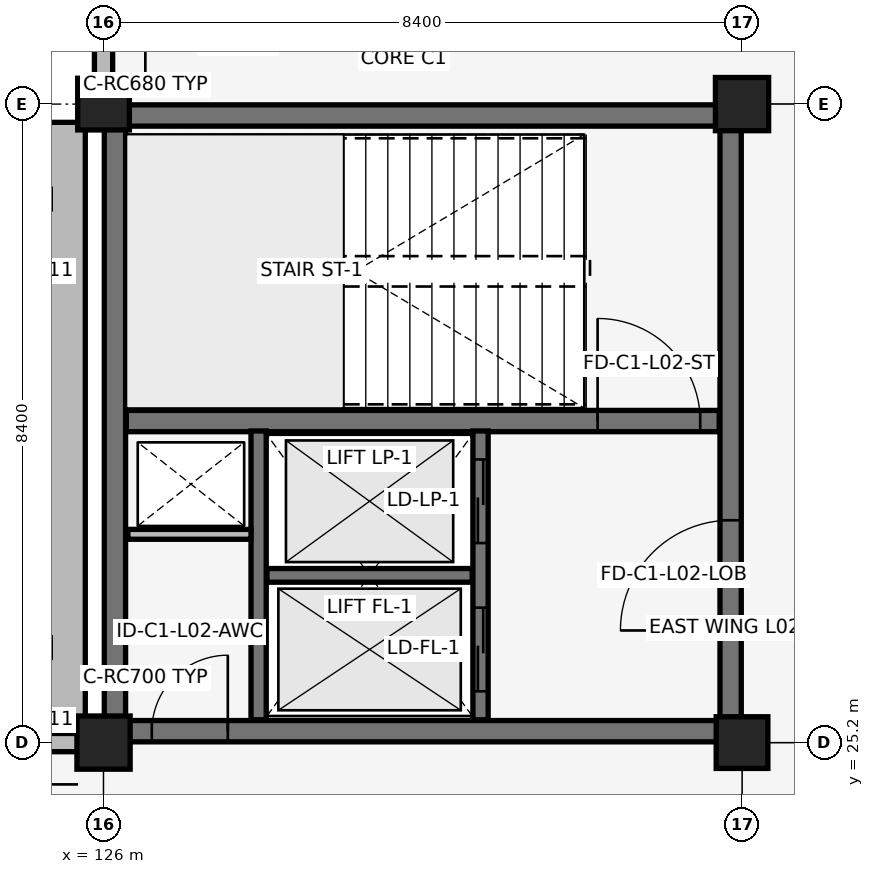
"""IFC4 building model, lengths in metres.
Left out: names, types, materials, properties, quantities, classifications, styles, units other than length and angle.
Written with IfcOpenShell. Run it as: python <this file> out.ifc"""

import sys

from ifc_helpers import new_model, si_unit, direction, frame, frame_2d, origin, origin_2d, place, context, subcontext, project, spatial, rectangle, extrude, element, fill, save


model = new_model("IFC4")
c1 = context("Model", 3, precision=1e-05, world=origin(), true_north=direction((0.0, 1.0)))
c2 = subcontext(c1, "Body", "Model", "MODEL_VIEW")
j1 = project(units=[si_unit("LENGTHUNIT", "METRE"), si_unit("PLANEANGLEUNIT", "RADIAN")], contexts=[c1])
p1 = place(None, origin())
s1 = spatial("IfcSite", under=j1, at=p1, CompositionType="ELEMENT")
p2 = place(p1, origin())
s2 = spatial("IfcBuilding", under=s1, at=p2, CompositionType="ELEMENT")
p3 = place(p2, frame((0.0, 0.0, 9.86)))
s3 = spatial("IfcBuildingStorey", under=s2, at=p3, CompositionType="ELEMENT", Elevation=9.86)
p4 = place(p3, frame((126.15, 25.35, 0.0), z_axis=(0.0, 0.0, 1.0), x_axis=(1.0, 0.0, 0.0)))
e1 = element("IfcWall", 1, at=p4, inside=s3, PredefinedType="SHEAR", context=c2, shape_type="SweptSolid", body=[
    extrude(rectangle(XDim=8.1, YDim=0.28, at=frame_2d((4.05, 0.0))), origin(), (0.0, 0.0, 1.0), 3.78),
])
p5 = place(p4, frame((0.485, 0.0, 0.0)))
e2 = element("IfcOpeningElement", 2, at=p5, cuts=e1, PredefinedType="OPENING", context=c2, shape_type="SweptSolid", body=[
    extrude(rectangle(XDim=1.0, YDim=2.15, at=frame_2d((0.5, 1.075))), frame((0.0, 0.15, 0.0), z_axis=(0.0, -1.0, 0.0), x_axis=(1.0, 0.0, 0.0)), (0.0, 0.0, 1.0), 0.3),
])
p6 = place(p3, frame((126.15, 33.45, 0.0), z_axis=(0.0, 0.0, 1.0), x_axis=(1.0, 0.0, 0.0)))
e3 = element("IfcWall", 3, at=p6, inside=s3, PredefinedType="SHEAR", context=c2, shape_type="SweptSolid", body=[
    extrude(rectangle(XDim=8.1, YDim=0.28, at=frame_2d((4.05, 0.0))), origin(), (0.0, 0.0, 1.0), 3.78),
])
p7 = place(p3, frame((126.15, 25.35, 0.0), z_axis=(0.0, 0.0, 1.0), x_axis=(0.0, 1.0, 0.0)))
e4 = element("IfcWall", 4, at=p7, inside=s3, PredefinedType="SHEAR", context=c2, shape_type="SweptSolid", body=[
    extrude(rectangle(XDim=8.1, YDim=0.28, at=frame_2d((4.05, 0.0))), origin(), (0.0, 0.0, 1.0), 3.78),
])
p8 = place(p3, frame((134.25, 25.35, 0.0), z_axis=(0.0, 0.0, 1.0), x_axis=(0.0, 1.0, 0.0)))
e5 = element("IfcWall", 5, at=p8, inside=s3, PredefinedType="SHEAR", context=c2, shape_type="SweptSolid", body=[
    extrude(rectangle(XDim=8.1, YDim=0.28, at=frame_2d((4.05, 0.0))), origin(), (0.0, 0.0, 1.0), 3.78),
])
p9 = place(p8, frame((1.325, 0.0, 0.0)))
e6 = element("IfcOpeningElement", 6, at=p9, cuts=e5, PredefinedType="OPENING", context=c2, shape_type="SweptSolid", body=[
    extrude(rectangle(XDim=1.45, YDim=2.15, at=frame_2d((0.725, 1.075))), frame((0.0, 0.15, 0.0), z_axis=(0.0, -1.0, 0.0), x_axis=(1.0, 0.0, 0.0)), (0.0, 0.0, 1.0), 0.3),
])
p10 = place(p3, frame((126.3, 29.43, 0.0), z_axis=(0.0, 0.0, 1.0), x_axis=(1.0, 0.0, 0.0)))
e7 = element("IfcWall", 7, at=p10, inside=s3, PredefinedType="SHEAR", context=c2, shape_type="SweptSolid", body=[
    extrude(rectangle(XDim=7.8, YDim=0.28, at=frame_2d((3.9, 0.0))), origin(), (0.0, 0.0, 1.0), 3.78),
])
p11 = place(p10, frame((6.2, 0.0, 0.0)))
e8 = element("IfcOpeningElement", 8, at=p11, cuts=e7, PredefinedType="OPENING", context=c2, shape_type="SweptSolid", body=[
    extrude(rectangle(XDim=1.35, YDim=2.15, at=frame_2d((0.675, 1.075))), frame((0.0, 0.15, 0.0), z_axis=(0.0, -1.0, 0.0), x_axis=(1.0, 0.0, 0.0)), (0.0, 0.0, 1.0), 0.3),
])
p12 = place(p3, frame((126.0, 25.2, 0.0), z_axis=(0.0, 0.0, 1.0), x_axis=(1.0, 0.0, 0.0)))
e9 = element("IfcColumn", 9, at=p12, inside=s3, PredefinedType="COLUMN", context=c2, shape_type="SweptSolid", body=[
    extrude(rectangle(XDim=0.7, YDim=0.7, at=origin_2d()), origin(), (0.0, 0.0, 1.0), 3.78),
])
for number, where, z_axis, x_axis in (
    (10, (126.0, 33.6, 0.0), (0.0, 0.0, 1.0), (1.0, 0.0, 0.0)),
    (11, (134.4, 25.2, 0.0), (0.0, 0.0, 1.0), (1.0, 0.0, 0.0)),
):
    element("IfcColumn", number, at=place(p3, frame(where, z_axis=z_axis, x_axis=x_axis)), inside=s3, PredefinedType="COLUMN", context=c2, shape_type="SweptSolid", body=[
        extrude(rectangle(XDim=0.68, YDim=0.68, at=origin_2d()), origin(), (0.0, 0.0, 1.0), 3.78),
    ])
p13 = place(p3, frame((134.4, 33.6, 0.0), z_axis=(0.0, 0.0, 1.0), x_axis=(1.0, 0.0, 0.0)))
e12 = element("IfcColumn", 12, at=p13, inside=s3, PredefinedType="COLUMN", context=c2, shape_type="SweptSolid", body=[
    extrude(rectangle(XDim=0.7, YDim=0.7, at=origin_2d()), origin(), (0.0, 0.0, 1.0), 3.78),
])
p14 = place(p3, frame((117.785, 25.2, 0.0), z_axis=(0.0, 0.0, 1.0), x_axis=(1.0, 0.0, 0.0)))
e13 = element("IfcWall", 13, at=p14, inside=s3, PredefinedType="SOLIDWALL", context=c2, shape_type="SweptSolid", body=[
    extrude(rectangle(XDim=7.88, YDim=0.24, at=frame_2d((3.94, 0.0))), origin(), (0.0, 0.0, 1.0), 3.01),
])
p15 = place(p14, frame((0.808, 0.0, 0.35)))
e14 = element("IfcOpeningElement", 14, at=p15, cuts=e13, PredefinedType="OPENING", context=c2, shape_type="SweptSolid", body=[
    extrude(rectangle(XDim=0.44, YDim=1.25, at=frame_2d((0.22, 0.625))), frame((0.0, 0.13, 0.0), z_axis=(0.0, -1.0, 0.0), x_axis=(1.0, 0.0, 0.0)), (0.0, 0.0, 1.0), 0.26),
])
p16 = place(p14, frame((2.264, 0.0, 0.35)))
e15 = element("IfcOpeningElement", 15, at=p16, cuts=e13, PredefinedType="OPENING", context=c2, shape_type="SweptSolid", body=[
    extrude(rectangle(XDim=0.44, YDim=1.25, at=frame_2d((0.22, 0.625))), frame((0.0, 0.13, 0.0), z_axis=(0.0, -1.0, 0.0), x_axis=(1.0, 0.0, 0.0)), (0.0, 0.0, 1.0), 0.26),
])
p17 = place(p14, frame((3.72, 0.0, 0.35)))
e16 = element("IfcOpeningElement", 16, at=p17, cuts=e13, PredefinedType="OPENING", context=c2, shape_type="SweptSolid", body=[
    extrude(rectangle(XDim=0.44, YDim=1.25, at=frame_2d((0.22, 0.625))), frame((0.0, 0.13, 0.0), z_axis=(0.0, -1.0, 0.0), x_axis=(1.0, 0.0, 0.0)), (0.0, 0.0, 1.0), 0.26),
])
p18 = place(p14, frame((5.176, 0.0, 0.35)))
e17 = element("IfcOpeningElement", 17, at=p18, cuts=e13, PredefinedType="OPENING", context=c2, shape_type="SweptSolid", body=[
    extrude(rectangle(XDim=0.44, YDim=1.25, at=frame_2d((0.22, 0.625))), frame((0.0, 0.13, 0.0), z_axis=(0.0, -1.0, 0.0), x_axis=(1.0, 0.0, 0.0)), (0.0, 0.0, 1.0), 0.26),
])
p19 = place(p14, frame((6.632, 0.0, 0.35)))
e18 = element("IfcOpeningElement", 18, at=p19, cuts=e13, PredefinedType="OPENING", context=c2, shape_type="SweptSolid", body=[
    extrude(rectangle(XDim=0.44, YDim=1.25, at=frame_2d((0.22, 0.625))), frame((0.0, 0.13, 0.0), z_axis=(0.0, -1.0, 0.0), x_axis=(1.0, 0.0, 0.0)), (0.0, 0.0, 1.0), 0.26),
])
p20 = place(p3, frame((125.52, 25.44, 0.0), z_axis=(0.0, 0.0, 1.0), x_axis=(0.0, 1.0, 0.0)))
e19 = element("IfcWall", 19, at=p20, inside=s3, PredefinedType="SOLIDWALL", context=c2, shape_type="SweptSolid", body=[
    extrude(rectangle(XDim=7.92, YDim=0.48, at=frame_2d((3.96, 0.0))), origin(), (0.0, 0.0, 1.0), 4.08),
])
p21 = place(p3, frame((126.0, 33.925, 0.0), z_axis=(0.0, 0.0, 1.0), x_axis=(0.0, 1.0, 0.0)))
e20 = element("IfcWall", 20, at=p21, inside=s3, PredefinedType="SOLIDWALL", context=c2, shape_type="SweptSolid", body=[
    extrude(rectangle(XDim=7.74, YDim=0.24, at=frame_2d((3.87, 0.0))), origin(), (0.0, 0.0, 1.0), 3.0),
])
p22 = place(p21, frame((0.794, 0.0, 0.35)))
e21 = element("IfcOpeningElement", 21, at=p22, cuts=e20, PredefinedType="OPENING", context=c2, shape_type="SweptSolid", body=[
    extrude(rectangle(XDim=0.44, YDim=1.25, at=frame_2d((0.22, 0.625))), frame((0.0, 0.13, 0.0), z_axis=(0.0, -1.0, 0.0), x_axis=(1.0, 0.0, 0.0)), (0.0, 0.0, 1.0), 0.26),
])
p23 = place(p21, frame((2.222, 0.0, 0.35)))
e22 = element("IfcOpeningElement", 22, at=p23, cuts=e20, PredefinedType="OPENING", context=c2, shape_type="SweptSolid", body=[
    extrude(rectangle(XDim=0.44, YDim=1.25, at=frame_2d((0.22, 0.625))), frame((0.0, 0.13, 0.0), z_axis=(0.0, -1.0, 0.0), x_axis=(1.0, 0.0, 0.0)), (0.0, 0.0, 1.0), 0.26),
])
p24 = place(p21, frame((3.65, 0.0, 0.35)))
e23 = element("IfcOpeningElement", 23, at=p24, cuts=e20, PredefinedType="OPENING", context=c2, shape_type="SweptSolid", body=[
    extrude(rectangle(XDim=0.44, YDim=1.25, at=frame_2d((0.22, 0.625))), frame((0.0, 0.13, 0.0), z_axis=(0.0, -1.0, 0.0), x_axis=(1.0, 0.0, 0.0)), (0.0, 0.0, 1.0), 0.26),
])
p25 = place(p21, frame((5.078, 0.0, 0.35)))
e24 = element("IfcOpeningElement", 24, at=p25, cuts=e20, PredefinedType="OPENING", context=c2, shape_type="SweptSolid", body=[
    extrude(rectangle(XDim=0.44, YDim=1.25, at=frame_2d((0.22, 0.625))), frame((0.0, 0.13, 0.0), z_axis=(0.0, -1.0, 0.0), x_axis=(1.0, 0.0, 0.0)), (0.0, 0.0, 1.0), 0.26),
])
p26 = place(p21, frame((6.506, 0.0, 0.35)))
e25 = element("IfcOpeningElement", 25, at=p26, cuts=e20, PredefinedType="OPENING", context=c2, shape_type="SweptSolid", body=[
    extrude(rectangle(XDim=0.44, YDim=1.25, at=frame_2d((0.22, 0.625))), frame((0.0, 0.13, 0.0), z_axis=(0.0, -1.0, 0.0), x_axis=(1.0, 0.0, 0.0)), (0.0, 0.0, 1.0), 0.26),
])
p27 = place(p3, frame((130.96, 25.5, 0.0), z_axis=(0.0, 0.0, 1.0), x_axis=(0.0, 1.0, 0.0)))
e26 = element("IfcWall", 26, at=p27, inside=s3, PredefinedType="SHEAR", context=c2, shape_type="SweptSolid", body=[
    extrude(rectangle(XDim=3.8, YDim=0.2, at=frame_2d((1.9, 0.0))), origin(), (0.0, 0.0, 1.0), 2.95),
])
p28 = place(p27, frame((0.375, 0.0, 0.0)))
e27 = element("IfcOpeningElement", 27, at=p28, cuts=e26, PredefinedType="OPENING", context=c2, shape_type="SweptSolid", body=[
    extrude(rectangle(XDim=1.1, YDim=2.15, at=frame_2d((0.55, 1.075))), frame((0.0, 0.11, 0.0), z_axis=(0.0, -1.0, 0.0), x_axis=(1.0, 0.0, 0.0)), (0.0, 0.0, 1.0), 0.22),
])
p29 = place(p27, frame((2.325, 0.0, 0.0)))
e28 = element("IfcOpeningElement", 28, at=p29, cuts=e26, PredefinedType="OPENING", context=c2, shape_type="SweptSolid", body=[
    extrude(rectangle(XDim=1.1, YDim=2.15, at=frame_2d((0.55, 1.075))), frame((0.0, 0.11, 0.0), z_axis=(0.0, -1.0, 0.0), x_axis=(1.0, 0.0, 0.0)), (0.0, 0.0, 1.0), 0.22),
])
p30 = place(p3, frame((128.04, 25.5, 0.0), z_axis=(0.0, 0.0, 1.0), x_axis=(0.0, 1.0, 0.0)))
e29 = element("IfcWall", 29, at=p30, inside=s3, PredefinedType="SHEAR", context=c2, shape_type="SweptSolid", body=[
    extrude(rectangle(XDim=3.8, YDim=0.2, at=frame_2d((1.9, 0.0))), origin(), (0.0, 0.0, 1.0), 2.95),
])
p31 = place(p3, frame((128.15, 27.4, 0.0), z_axis=(0.0, 0.0, 1.0), x_axis=(1.0, 0.0, 0.0)))
e30 = element("IfcWall", 30, at=p31, inside=s3, PredefinedType="SHEAR", context=c2, shape_type="SweptSolid", body=[
    extrude(rectangle(XDim=2.7, YDim=0.18, at=frame_2d((1.35, 0.0))), origin(), (0.0, 0.0, 1.0), 3.78),
])
p32 = place(p3, frame((126.32, 27.94, 0.0), z_axis=(0.0, 0.0, 1.0), x_axis=(1.0, 0.0, 0.0)))
e31 = element("IfcWall", 31, at=p32, inside=s3, PredefinedType="PARTITIONING", context=c2, shape_type="SweptSolid", body=[
    extrude(rectangle(XDim=1.62, YDim=0.13, at=frame_2d((0.81, 0.0))), origin(), (0.0, 0.0, 1.0), 3.0),
])
p33 = place(p11, origin())
e32 = element("IfcDoor", 32, at=p33, inside=s3, OperationType="SINGLE_SWING_LEFT", PredefinedType="DOOR", context=c2, shape_type="SweptSolid", body=[
    extrude(rectangle(XDim=1.35, YDim=2.15, at=frame_2d((0.675, 1.075))), frame((0.0, 0.025, 0.0), z_axis=(0.0, -1.0, 0.0), x_axis=(1.0, 0.0, 0.0)), (0.0, 0.0, 1.0), 0.05),
])
fill(e8, e32)
p34 = place(p28, origin())
e33 = element("IfcDoor", 33, at=p34, inside=s3, OperationType="SLIDING_TO_LEFT", PredefinedType="DOOR", context=c2, shape_type="SweptSolid", body=[
    extrude(rectangle(XDim=1.1, YDim=2.15, at=frame_2d((0.55, 1.075))), frame((0.0, 0.025, 0.0), z_axis=(0.0, -1.0, 0.0), x_axis=(1.0, 0.0, 0.0)), (0.0, 0.0, 1.0), 0.05),
])
fill(e27, e33)
p35 = place(p29, origin())
e34 = element("IfcDoor", 34, at=p35, inside=s3, OperationType="SLIDING_TO_LEFT", PredefinedType="DOOR", context=c2, shape_type="SweptSolid", body=[
    extrude(rectangle(XDim=1.1, YDim=2.15, at=frame_2d((0.55, 1.075))), frame((0.0, 0.025, 0.0), z_axis=(0.0, -1.0, 0.0), x_axis=(1.0, 0.0, 0.0)), (0.0, 0.0, 1.0), 0.05),
])
fill(e28, e34)
p36 = place(p9, origin())
e35 = element("IfcDoor", 35, at=p36, inside=s3, OperationType="DOUBLE_DOOR_SINGLE_SWING", PredefinedType="DOOR", context=c2, shape_type="SweptSolid", body=[
    extrude(rectangle(XDim=1.45, YDim=2.15, at=frame_2d((0.725, 1.075))), frame((0.0, 0.025, 0.0), z_axis=(0.0, -1.0, 0.0), x_axis=(1.0, 0.0, 0.0)), (0.0, 0.0, 1.0), 0.05),
])
fill(e6, e35)
p37 = place(p5, origin())
e36 = element("IfcDoor", 36, at=p37, inside=s3, OperationType="SINGLE_SWING_RIGHT", PredefinedType="DOOR", context=c2, shape_type="SweptSolid", body=[
    extrude(rectangle(XDim=1.0, YDim=2.15, at=frame_2d((0.5, 1.075))), frame((0.0, 0.025, 0.0), z_axis=(0.0, -1.0, 0.0), x_axis=(1.0, 0.0, 0.0)), (0.0, 0.0, 1.0), 0.05),
])
fill(e2, e36)
save(model, sys.argv[1])
